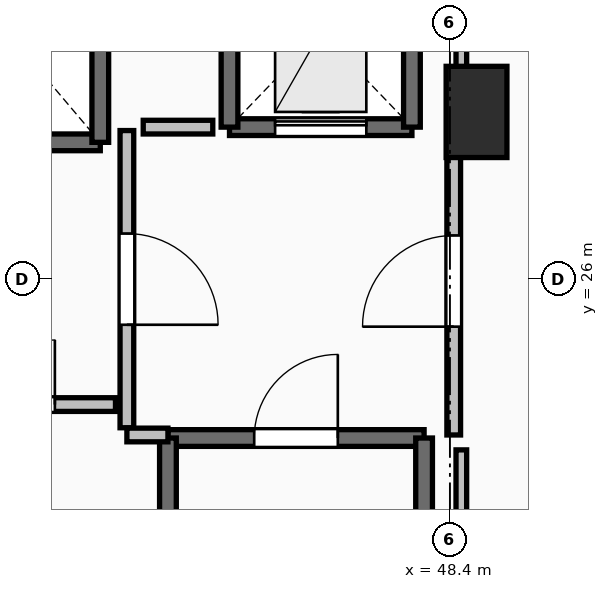
"""IFC4 building model, lengths in metres.
Left out: names, types, materials, properties, quantities, classifications, styles, units other than length and angle.
Written with IfcOpenShell. Run it as: python <this file> out.ifc"""

import sys

from ifc_helpers import new_model, si_unit, direction, frame, frame_2d, origin, origin_2d, place, context, subcontext, project, spatial, rectangle, extrude, element, fill, save


model = new_model("IFC4")
c1 = context("Model", 3, precision=1e-05, world=origin(), true_north=direction((0.0, 1.0)))
c2 = subcontext(c1, "Body", "Model", "MODEL_VIEW")
j1 = project(units=[si_unit("LENGTHUNIT", "METRE"), si_unit("PLANEANGLEUNIT", "RADIAN")], contexts=[c1])
p1 = place(None, origin())
s1 = spatial("IfcSite", under=j1, at=p1, CompositionType="ELEMENT")
p2 = place(p1, origin())
s2 = spatial("IfcBuilding", under=s1, at=p2, CompositionType="ELEMENT")
p3 = place(p2, frame((0.0, 0.0, 4.8)))
s3 = spatial("IfcBuildingStorey", under=s2, at=p3, CompositionType="ELEMENT", Elevation=4.8)
p4 = place(p3, frame((48.75, 28.2, 0.0), z_axis=(0.0, 0.0, 1.0), x_axis=(1.0, 0.0, 0.0)))
e1 = element("IfcColumn", 1, at=p4, inside=s3, PredefinedType="PILASTER", context=c2, shape_type="SweptSolid", body=[
    extrude(rectangle(XDim=0.8, YDim=1.2, at=origin_2d()), origin(), (0.0, 0.0, 1.0), 4.8),
])
p5 = place(p3, frame((44.69, 23.91, 0.0), z_axis=(0.0, 0.0, 1.0), x_axis=(1.0, 0.0, 0.0)))
e2 = element("IfcWall", 2, at=p5, inside=s3, PredefinedType="SOLIDWALL", context=c2, shape_type="SweptSolid", body=[
    extrude(rectangle(XDim=3.37, YDim=0.22, at=frame_2d((1.685, 0.0))), origin(), (0.0, 0.0, 1.0), 4.48),
])
p6 = place(p5, frame((1.135, 0.0, 0.0)))
e3 = element("IfcOpeningElement", 3, at=p6, cuts=e2, PredefinedType="OPENING", context=c2, shape_type="SweptSolid", body=[
    extrude(rectangle(XDim=1.1, YDim=2.15, at=frame_2d((0.55, 1.075))), frame((0.0, 0.125, 0.0), z_axis=(0.0, -1.0, 0.0), x_axis=(1.0, 0.0, 0.0)), (0.0, 0.0, 1.0), 0.25),
])
for number, where, z_axis, x_axis in (
    (4, (48.06, 23.91, 0.0), (0.0, 0.0, 1.0), (0.0, -1.0, 0.0)),
    (5, (44.69, 16.49, 0.0), (0.0, 0.0, 1.0), (0.0, 1.0, 0.0)),
):
    element("IfcWall", number, at=place(p3, frame(where, z_axis=z_axis, x_axis=x_axis)), inside=s3, PredefinedType="SOLIDWALL", context=c2, shape_type="SweptSolid", body=[
        extrude(rectangle(XDim=7.42, YDim=0.22, at=frame_2d((3.71, 0.0))), origin(), (0.0, 0.0, 1.0), 4.48),
    ])
p7 = place(p3, frame((41.6, 27.8, 0.0), z_axis=(0.0, 0.0, 1.0), x_axis=(1.0, 0.0, 0.0)))
e6 = element("IfcWall", 6, at=p7, inside=s3, PredefinedType="SOLIDWALL", context=c2, shape_type="SweptSolid", body=[
    extrude(rectangle(XDim=2.2, YDim=0.22, at=frame_2d((1.1, 0.0))), origin(), (0.0, 0.0, 1.0), 4.48),
])
p8 = place(p3, frame((43.8, 27.8, 0.0), z_axis=(0.0, 0.0, 1.0), x_axis=(0.0, 1.0, 0.0)))
e7 = element("IfcWall", 7, at=p8, inside=s3, PredefinedType="SOLIDWALL", context=c2, shape_type="SweptSolid", body=[
    extrude(rectangle(XDim=2.6, YDim=0.22, at=frame_2d((1.3, 0.0))), origin(), (0.0, 0.0, 1.0), 4.48),
])
p9 = place(p3, frame((45.5, 28.0, 0.0), z_axis=(0.0, 0.0, 1.0), x_axis=(1.0, 0.0, 0.0)))
e8 = element("IfcWall", 8, at=p9, inside=s3, PredefinedType="SHEAR", context=c2, shape_type="SweptSolid", body=[
    extrude(rectangle(XDim=2.4, YDim=0.22, at=frame_2d((1.2, 0.0))), origin(), (0.0, 0.0, 1.0), 4.48),
])
p10 = place(p9, frame((0.6, 0.0, 0.0)))
e9 = element("IfcOpeningElement", 9, at=p10, cuts=e8, PredefinedType="OPENING", context=c2, shape_type="SweptSolid", body=[
    extrude(rectangle(XDim=1.2, YDim=2.2, at=frame_2d((0.6, 1.1))), frame((0.0, 0.125, 0.0), z_axis=(0.0, -1.0, 0.0), x_axis=(1.0, 0.0, 0.0)), (0.0, 0.0, 1.0), 0.25),
])
for number, where, z_axis, x_axis in (
    (10, (47.9, 28.0, 0.0), (0.0, 0.0, 1.0), (0.0, 1.0, 0.0)),
    (11, (45.5, 30.5, 0.0), (0.0, 0.0, 1.0), (0.0, -1.0, 0.0)),
):
    element("IfcWall", number, at=place(p3, frame(where, z_axis=z_axis, x_axis=x_axis)), inside=s3, PredefinedType="SHEAR", context=c2, shape_type="SweptSolid", body=[
        extrude(rectangle(XDim=2.5, YDim=0.22, at=frame_2d((1.25, 0.0))), origin(), (0.0, 0.0, 1.0), 4.48),
    ])
p11 = place(p3, frame((44.15, 27.955, 0.0), z_axis=(0.0, 0.0, 1.0), x_axis=(0.0, -1.0, 0.0)))
e12 = element("IfcWall", 12, at=p11, inside=s3, PredefinedType="PARTITIONING", context=c2, shape_type="SweptSolid", body=[
    extrude(rectangle(XDim=3.91, YDim=0.18, at=frame_2d((1.955, 0.0))), origin(), (0.0, 0.0, 1.0), 4.48),
])
p12 = place(p11, frame((1.355, 0.0, 0.0)))
e13 = element("IfcOpeningElement", 13, at=p12, cuts=e12, PredefinedType="OPENING", context=c2, shape_type="SweptSolid", body=[
    extrude(rectangle(XDim=1.2, YDim=2.15, at=frame_2d((0.6, 1.075))), frame((0.0, 0.105, 0.0), z_axis=(0.0, -1.0, 0.0), x_axis=(1.0, 0.0, 0.0)), (0.0, 0.0, 1.0), 0.21),
])
p13 = place(p3, frame((44.15, 23.95, 0.0), z_axis=(0.0, 0.0, 1.0), x_axis=(1.0, 0.0, 0.0)))
e14 = element("IfcWall", 14, at=p13, inside=s3, PredefinedType="PARTITIONING", context=c2, shape_type="SweptSolid", body=[
    extrude(rectangle(XDim=0.54, YDim=0.18, at=frame_2d((0.27, 0.0))), origin(), (0.0, 0.0, 1.0), 4.48),
])
p14 = place(p3, frame((48.45, 23.95, 0.0), z_axis=(0.0, 0.0, 1.0), x_axis=(0.0, 1.0, 0.0)))
e15 = element("IfcWall", 15, at=p14, inside=s3, PredefinedType="PARTITIONING", context=c2, shape_type="SweptSolid", body=[
    extrude(rectangle(XDim=4.05, YDim=0.18, at=frame_2d((2.025, 0.0))), origin(), (0.0, 0.0, 1.0), 4.48),
])
p15 = place(p14, frame((1.425, 0.0, 0.0)))
e16 = element("IfcOpeningElement", 16, at=p15, cuts=e15, PredefinedType="OPENING", context=c2, shape_type="SweptSolid", body=[
    extrude(rectangle(XDim=1.2, YDim=2.15, at=frame_2d((0.6, 1.075))), frame((0.0, 0.105, 0.0), z_axis=(0.0, -1.0, 0.0), x_axis=(1.0, 0.0, 0.0)), (0.0, 0.0, 1.0), 0.21),
])
p16 = place(p3, frame((41.555, 24.35, 0.0), z_axis=(0.0, 0.0, 1.0), x_axis=(1.0, 0.0, 0.0)))
e17 = element("IfcWall", 17, at=p16, inside=s3, PredefinedType="PARTITIONING", context=c2, shape_type="SweptSolid", body=[
    extrude(rectangle(XDim=2.445, YDim=0.18, at=frame_2d((1.223, 0.0))), origin(), (0.0, 0.0, 1.0), 4.48),
])
p17 = place(p16, frame((0.798, 0.0, 0.0)))
e18 = element("IfcOpeningElement", 18, at=p17, cuts=e17, PredefinedType="OPENING", context=c2, shape_type="SweptSolid", body=[
    extrude(rectangle(XDim=0.85, YDim=2.1, at=frame_2d((0.425, 1.05))), frame((0.0, 0.105, 0.0), z_axis=(0.0, -1.0, 0.0), x_axis=(1.0, 0.0, 0.0)), (0.0, 0.0, 1.0), 0.21),
])
p18 = place(p3, frame((45.28, 28.0, 0.0), z_axis=(0.0, 0.0, 1.0), x_axis=(-1.0, 0.0, 0.0)))
e19 = element("IfcWall", 19, at=p18, inside=s3, PredefinedType="PARTITIONING", context=c2, shape_type="SweptSolid", body=[
    extrude(rectangle(XDim=0.915, YDim=0.18, at=frame_2d((0.458, 0.0))), origin(), (0.0, 0.0, 1.0), 4.48),
])
p19 = place(p3, frame((48.55, 33.45, 0.0), z_axis=(0.0, 0.0, 1.0), x_axis=(0.0, -1.0, 0.0)))
e20 = element("IfcWall", 20, at=p19, inside=s3, PredefinedType="PARTITIONING", context=c2, shape_type="SweptSolid", body=[
    extrude(rectangle(XDim=5.254, YDim=0.14, at=frame_2d((2.627, 0.0))), origin(), (0.0, 0.0, 1.0), 3.672),
])
p20 = place(p3, frame((48.55, 23.754, 0.0), z_axis=(0.0, 0.0, 1.0), x_axis=(0.0, -1.0, 0.0)))
e21 = element("IfcWall", 21, at=p20, inside=s3, PredefinedType="PARTITIONING", context=c2, shape_type="SweptSolid", body=[
    extrude(rectangle(XDim=7.514, YDim=0.14, at=frame_2d((3.757, 0.0))), origin(), (0.0, 0.0, 1.0), 2.406),
])
p21 = place(p6, origin())
e22 = element("IfcDoor", 22, at=p21, inside=s3, OperationType="SINGLE_SWING_RIGHT", PredefinedType="DOOR", context=c2, shape_type="SweptSolid", body=[
    extrude(rectangle(XDim=1.1, YDim=2.15, at=frame_2d((0.55, 1.075))), frame((0.0, 0.025, 0.0), z_axis=(0.0, -1.0, 0.0), x_axis=(1.0, 0.0, 0.0)), (0.0, 0.0, 1.0), 0.05),
])
fill(e3, e22)
p22 = place(p10, origin())
e23 = element("IfcDoor", 23, at=p22, inside=s3, OperationType="SLIDING_TO_LEFT", PredefinedType="DOOR", context=c2, shape_type="SweptSolid", body=[
    extrude(rectangle(XDim=1.2, YDim=2.2, at=frame_2d((0.6, 1.1))), frame((0.0, 0.025, 0.0), z_axis=(0.0, -1.0, 0.0), x_axis=(1.0, 0.0, 0.0)), (0.0, 0.0, 1.0), 0.05),
])
fill(e9, e23)
p23 = place(p12, origin())
e24 = element("IfcDoor", 24, at=p23, inside=s3, OperationType="SINGLE_SWING_RIGHT", PredefinedType="DOOR", context=c2, shape_type="SweptSolid", body=[
    extrude(rectangle(XDim=1.2, YDim=2.15, at=frame_2d((0.6, 1.075))), frame((0.0, 0.025, 0.0), z_axis=(0.0, -1.0, 0.0), x_axis=(1.0, 0.0, 0.0)), (0.0, 0.0, 1.0), 0.05),
])
fill(e13, e24)
p24 = place(p15, origin())
e25 = element("IfcDoor", 25, at=p24, inside=s3, OperationType="SINGLE_SWING_LEFT", PredefinedType="DOOR", context=c2, shape_type="SweptSolid", body=[
    extrude(rectangle(XDim=1.2, YDim=2.15, at=frame_2d((0.6, 1.075))), frame((0.0, 0.025, 0.0), z_axis=(0.0, -1.0, 0.0), x_axis=(1.0, 0.0, 0.0)), (0.0, 0.0, 1.0), 0.05),
])
fill(e16, e25)
p25 = place(p17, origin())
e26 = element("IfcDoor", 26, at=p25, inside=s3, OperationType="SINGLE_SWING_RIGHT", PredefinedType="DOOR", context=c2, shape_type="SweptSolid", body=[
    extrude(rectangle(XDim=0.85, YDim=2.1, at=frame_2d((0.425, 1.05))), frame((0.0, 0.025, 0.0), z_axis=(0.0, -1.0, 0.0), x_axis=(1.0, 0.0, 0.0)), (0.0, 0.0, 1.0), 0.05),
])
fill(e18, e26)
save(model, sys.argv[1])
